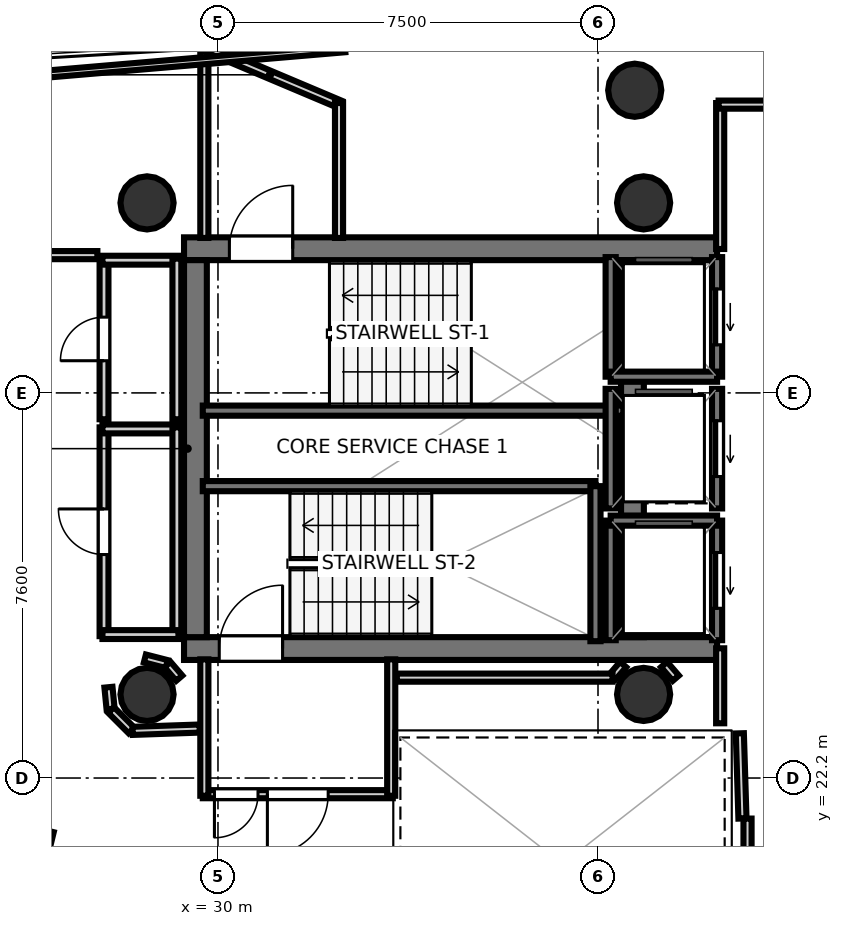
"""IFC4 building model, lengths in metres.
Left out: names, types, materials, properties, quantities, classifications, styles, units other than length and angle.
Written with IfcOpenShell. Run it as: python <this file> out.ifc"""

import sys

from ifc_helpers import new_model, si_unit, direction, frame, frame_2d, origin, origin_2d, place, context, subcontext, project, spatial, rectangle, hollow_circle, extrude, element, fill, save


model = new_model("IFC4")
c1 = context("Model", 3, precision=1e-05, world=origin(), true_north=direction((0.0, 1.0)))
c2 = subcontext(c1, "Body", "Model", "MODEL_VIEW")
j1 = project(units=[si_unit("LENGTHUNIT", "METRE"), si_unit("PLANEANGLEUNIT", "RADIAN")], contexts=[c1])
p1 = place(None, origin())
s1 = spatial("IfcSite", under=j1, at=p1, CompositionType="ELEMENT")
p2 = place(p1, origin())
s2 = spatial("IfcBuilding", under=s1, at=p2, CompositionType="ELEMENT")
p3 = place(p2, frame((0.0, 0.0, 264.9)))
s3 = spatial("IfcBuildingStorey", under=s2, at=p3, CompositionType="ELEMENT", Elevation=264.9)
p4 = place(p3, frame((29.33, 32.645, 0.0), z_axis=(0.0, 0.0, 1.0), x_axis=(1.0, 0.0, 0.0)))
e1 = element("IfcWall", 1, at=p4, inside=s3, PredefinedType="SHEAR", context=c2, shape_type="SweptSolid", body=[
    extrude(rectangle(XDim=10.52, YDim=0.45, at=frame_2d((5.26, 0.0))), origin(), (0.0, 0.0, 1.0), 3.52),
])
p5 = place(p4, frame((0.895, 0.0, 0.0)))
e2 = element("IfcOpeningElement", 2, at=p5, cuts=e1, PredefinedType="OPENING", context=c2, shape_type="SweptSolid", body=[
    extrude(rectangle(XDim=1.25, YDim=2.15, at=frame_2d((0.625, 1.075))), frame((0.0, 0.235, 0.0), z_axis=(0.0, -1.0, 0.0), x_axis=(1.0, 0.0, 0.0)), (0.0, 0.0, 1.0), 0.47),
])
p6 = place(p3, frame((29.33, 24.755, 0.0), z_axis=(0.0, 0.0, 1.0), x_axis=(1.0, 0.0, 0.0)))
e3 = element("IfcWall", 3, at=p6, inside=s3, PredefinedType="SHEAR", context=c2, shape_type="SweptSolid", body=[
    extrude(rectangle(XDim=10.52, YDim=0.45, at=frame_2d((5.26, 0.0))), origin(), (0.0, 0.0, 1.0), 3.52),
])
p7 = place(p6, frame((0.695, 0.0, 0.0)))
e4 = element("IfcOpeningElement", 4, at=p7, cuts=e3, PredefinedType="OPENING", context=c2, shape_type="SweptSolid", body=[
    extrude(rectangle(XDim=1.25, YDim=2.15, at=frame_2d((0.625, 1.075))), frame((0.0, 0.235, 0.0), z_axis=(0.0, -1.0, 0.0), x_axis=(1.0, 0.0, 0.0)), (0.0, 0.0, 1.0), 0.47),
])
for number, where, z_axis, x_axis in (
    (5, (29.555, 24.98, 0.0), (0.0, 0.0, 1.0), (0.0, 1.0, 0.0)),
    (6, (38.18, 24.98, 0.0), (0.0, 0.0, 1.0), (0.0, 1.0, 0.0)),
):
    element("IfcWall", number, at=place(p3, frame(where, z_axis=z_axis, x_axis=x_axis)), inside=s3, PredefinedType="SHEAR", context=c2, shape_type="SweptSolid", body=[
        extrude(rectangle(XDim=7.44, YDim=0.45, at=frame_2d((3.72, 0.0))), origin(), (0.0, 0.0, 1.0), 3.52),
    ])
for number, where, z_axis, x_axis in (
    (7, (28.6, 33.55, 0.0), (0.0, 0.0, 1.0), (1.0, 0.0, 0.0)),
    (8, (28.6, 23.85, 0.0), (0.0, 0.0, 1.0), (1.0, 0.0, 0.0)),
    (9, (38.4, 33.55, 0.0), (0.0, 0.0, 1.0), (1.0, 0.0, 0.0)),
    (10, (38.4, 23.85, 0.0), (0.0, 0.0, 1.0), (1.0, 0.0, 0.0)),
    (11, (38.225, 35.773, 0.0), (0.0, 0.0, 1.0), (1.0, 0.0, 0.0)),
):
    element("IfcColumn", number, at=place(p3, frame(where, z_axis=z_axis, x_axis=x_axis)), inside=s3, PredefinedType="COLUMN", context=c2, shape_type="SweptSolid", body=[
        extrude(hollow_circle(Radius=0.525, WallThickness=0.028, at=origin_2d()), origin(), (0.0, 0.0, 1.0), 3.7),
    ])
p8 = place(p3, frame((29.7, 29.45, 0.0), z_axis=(0.0, 0.0, 1.0), x_axis=(1.0, 0.0, 0.0)))
e12 = element("IfcWall", 12, at=p8, inside=s3, PredefinedType="SOLIDWALL", context=c2, shape_type="SweptSolid", body=[
    extrude(rectangle(XDim=8.3, YDim=0.2, at=frame_2d((4.15, 0.0))), origin(), (0.0, 0.0, 1.0), 3.52),
])
p9 = place(p3, frame((29.7, 27.96, 0.0), z_axis=(0.0, 0.0, 1.0), x_axis=(1.0, 0.0, 0.0)))
e13 = element("IfcWall", 13, at=p9, inside=s3, PredefinedType="SOLIDWALL", context=c2, shape_type="SweptSolid", body=[
    extrude(rectangle(XDim=7.75, YDim=0.2, at=frame_2d((3.875, 0.0))), origin(), (0.0, 0.0, 1.0), 3.52),
])
p10 = place(p3, frame((37.45, 24.9, 0.0), z_axis=(0.0, 0.0, 1.0), x_axis=(0.0, 1.0, 0.0)))
e14 = element("IfcWall", 14, at=p10, inside=s3, PredefinedType="SOLIDWALL", context=c2, shape_type="SweptSolid", body=[
    extrude(rectangle(XDim=3.06, YDim=0.2, at=frame_2d((1.53, 0.0))), origin(), (0.0, 0.0, 1.0), 3.52),
])
p11 = place(p3, frame((39.85, 30.12, 0.0), z_axis=(0.0, 0.0, 1.0), x_axis=(0.0, 1.0, 0.0)))
e15 = element("IfcWall", 15, at=p11, inside=s3, PredefinedType="SOLIDWALL", context=c2, shape_type="SweptSolid", body=[
    extrude(rectangle(XDim=2.36, YDim=0.2, at=frame_2d((1.18, 0.0))), origin(), (0.0, 0.0, 1.0), 3.52),
])
p12 = place(p11, frame((0.63, 0.0, 0.0)))
e16 = element("IfcOpeningElement", 16, at=p12, cuts=e15, PredefinedType="OPENING", context=c2, shape_type="SweptSolid", body=[
    extrude(rectangle(XDim=1.1, YDim=2.15, at=frame_2d((0.55, 1.075))), frame((0.0, 0.11, 0.0), z_axis=(0.0, -1.0, 0.0), x_axis=(1.0, 0.0, 0.0)), (0.0, 0.0, 1.0), 0.22),
])
p13 = place(p3, frame((37.75, 30.12, 0.0), z_axis=(0.0, 0.0, 1.0), x_axis=(0.0, 1.0, 0.0)))
e17 = element("IfcWall", 17, at=p13, inside=s3, PredefinedType="SOLIDWALL", context=c2, shape_type="SweptSolid", body=[
    extrude(rectangle(XDim=2.36, YDim=0.2, at=frame_2d((1.18, 0.0))), origin(), (0.0, 0.0, 1.0), 3.52),
])
p14 = place(p3, frame((37.75, 30.12, 0.0), z_axis=(0.0, 0.0, 1.0), x_axis=(1.0, 0.0, 0.0)))
e18 = element("IfcWall", 18, at=p14, inside=s3, PredefinedType="SOLIDWALL", context=c2, shape_type="SweptSolid", body=[
    extrude(rectangle(XDim=2.1, YDim=0.2, at=frame_2d((1.05, 0.0))), origin(), (0.0, 0.0, 1.0), 3.52),
])
p15 = place(p3, frame((39.85, 24.92, 0.0), z_axis=(0.0, 0.0, 1.0), x_axis=(0.0, 1.0, 0.0)))
e19 = element("IfcWall", 19, at=p15, inside=s3, PredefinedType="SOLIDWALL", context=c2, shape_type="SweptSolid", body=[
    extrude(rectangle(XDim=2.36, YDim=0.2, at=frame_2d((1.18, 0.0))), origin(), (0.0, 0.0, 1.0), 3.52),
])
p16 = place(p15, frame((0.63, 0.0, 0.0)))
e20 = element("IfcOpeningElement", 20, at=p16, cuts=e19, PredefinedType="OPENING", context=c2, shape_type="SweptSolid", body=[
    extrude(rectangle(XDim=1.1, YDim=2.15, at=frame_2d((0.55, 1.075))), frame((0.0, 0.11, 0.0), z_axis=(0.0, -1.0, 0.0), x_axis=(1.0, 0.0, 0.0)), (0.0, 0.0, 1.0), 0.22),
])
p17 = place(p3, frame((37.75, 24.92, 0.0), z_axis=(0.0, 0.0, 1.0), x_axis=(0.0, 1.0, 0.0)))
e21 = element("IfcWall", 21, at=p17, inside=s3, PredefinedType="SOLIDWALL", context=c2, shape_type="SweptSolid", body=[
    extrude(rectangle(XDim=2.36, YDim=0.2, at=frame_2d((1.18, 0.0))), origin(), (0.0, 0.0, 1.0), 3.52),
])
p18 = place(p3, frame((37.75, 27.28, 0.0), z_axis=(0.0, 0.0, 1.0), x_axis=(1.0, 0.0, 0.0)))
e22 = element("IfcWall", 22, at=p18, inside=s3, PredefinedType="SOLIDWALL", context=c2, shape_type="SweptSolid", body=[
    extrude(rectangle(XDim=2.1, YDim=0.2, at=frame_2d((1.05, 0.0))), origin(), (0.0, 0.0, 1.0), 3.52),
])
p19 = place(p3, frame((39.85, 27.52, 0.0), z_axis=(0.0, 0.0, 1.0), x_axis=(0.0, 1.0, 0.0)))
e23 = element("IfcWall", 23, at=p19, inside=s3, PredefinedType="SOLIDWALL", context=c2, shape_type="SweptSolid", body=[
    extrude(rectangle(XDim=2.36, YDim=0.2, at=frame_2d((1.18, 0.0))), origin(), (0.0, 0.0, 1.0), 3.52),
])
p20 = place(p19, frame((0.63, 0.0, 0.0)))
e24 = element("IfcOpeningElement", 24, at=p20, cuts=e23, PredefinedType="OPENING", context=c2, shape_type="SweptSolid", body=[
    extrude(rectangle(XDim=1.1, YDim=2.15, at=frame_2d((0.55, 1.075))), frame((0.0, 0.11, 0.0), z_axis=(0.0, -1.0, 0.0), x_axis=(1.0, 0.0, 0.0)), (0.0, 0.0, 1.0), 0.22),
])
p21 = place(p3, frame((37.75, 27.52, 0.0), z_axis=(0.0, 0.0, 1.0), x_axis=(0.0, 1.0, 0.0)))
e25 = element("IfcWall", 25, at=p21, inside=s3, PredefinedType="SOLIDWALL", context=c2, shape_type="SweptSolid", body=[
    extrude(rectangle(XDim=2.36, YDim=0.2, at=frame_2d((1.18, 0.0))), origin(), (0.0, 0.0, 1.0), 3.52),
])
p22 = place(p3, frame((29.731, 32.858, 0.0), z_axis=(0.0, 0.0, 1.0), x_axis=(0.0, 1.0, 0.0)))
e26 = element("IfcWall", 26, at=p22, inside=s3, PredefinedType="PARTITIONING", context=c2, shape_type="SweptSolid", body=[
    extrude(rectangle(XDim=3.834, YDim=0.16, at=frame_2d((1.917, 0.0))), origin(), (0.0, 0.0, 1.0), 2.84),
])
p23 = place(p3, frame((29.632, 36.666, 0.0), z_axis=(0.0, 0.0, 1.0), x_axis=(0.921284244724, -0.388889882131, 0.0)))
e27 = element("IfcWall", 27, at=p23, inside=s3, PredefinedType="PARTITIONING", context=c2, shape_type="SweptSolid", body=[
    extrude(rectangle(XDim=3.027, YDim=0.16, at=frame_2d((1.513, 0.0))), origin(), (0.0, 0.0, 1.0), 2.84),
])
p24 = place(p3, frame((32.389, 35.52, 0.0), z_axis=(0.0, 0.0, 1.0), x_axis=(0.0, -1.0, 0.0)))
e28 = element("IfcWall", 28, at=p24, inside=s3, PredefinedType="PARTITIONING", context=c2, shape_type="SweptSolid", body=[
    extrude(rectangle(XDim=2.662, YDim=0.16, at=frame_2d((1.331, 0.0))), origin(), (0.0, 0.0, 1.0), 2.84),
])
p25 = place(p3, frame((33.45, 21.881, 0.0), z_axis=(0.0, 0.0, 1.0), x_axis=(-1.0, 0.0, 0.0)))
e29 = element("IfcWall", 29, at=p25, inside=s3, PredefinedType="PARTITIONING", context=c2, shape_type="SweptSolid", body=[
    extrude(rectangle(XDim=3.75, YDim=0.16, at=frame_2d((1.875, 0.0))), origin(), (0.0, 0.0, 1.0), 2.84),
])
p26 = place(p25, frame((1.275, 0.0, 0.0)))
e30 = element("IfcOpeningElement", 30, at=p26, cuts=e29, PredefinedType="OPENING", context=c2, shape_type="SweptSolid", body=[
    extrude(rectangle(XDim=1.2, YDim=2.15, at=frame_2d((0.6, 1.075))), frame((0.0, 0.09, 0.0), z_axis=(0.0, -1.0, 0.0), x_axis=(1.0, 0.0, 0.0)), (0.0, 0.0, 1.0), 0.18),
])
p27 = place(p25, frame((2.66, 0.0, 0.0)))
e31 = element("IfcOpeningElement", 31, at=p27, cuts=e29, PredefinedType="OPENING", context=c2, shape_type="SweptSolid", body=[
    extrude(rectangle(XDim=0.86, YDim=2.05, at=frame_2d((0.43, 1.025))), frame((0.0, 0.09, 0.0), z_axis=(0.0, -1.0, 0.0), x_axis=(1.0, 0.0, 0.0)), (0.0, 0.0, 1.0), 0.18),
])
for number, where, z_axis, x_axis in (
    (32, (29.731, 21.85, 0.0), (0.0, 0.0, 1.0), (0.0, 1.0, 0.0)),
    (33, (33.419, 24.542, 0.0), (0.0, 0.0, 1.0), (0.0, -1.0, 0.0)),
):
    element("IfcWall", number, at=place(p3, frame(where, z_axis=z_axis, x_axis=x_axis)), inside=s3, PredefinedType="PARTITIONING", context=c2, shape_type="SweptSolid", body=[
        extrude(rectangle(XDim=2.692, YDim=0.16, at=frame_2d((1.346, 0.0))), origin(), (0.0, 0.0, 1.0), 2.84),
    ])
p28 = place(p3, frame((40.351, 21.401, 0.0), z_axis=(0.0, 0.0, 1.0), x_axis=(-0.031058045979, 0.999517582527, 0.0)))
e34 = element("IfcWall", 34, at=p28, inside=s3, PredefinedType="PARTITIONING", context=c2, shape_type="SweptSolid", body=[
    extrude(rectangle(XDim=1.682, YDim=0.16, at=frame_2d((0.841, 0.0))), origin(), (0.0, 0.0, 1.0), 2.84),
])
p29 = place(p3, frame((39.911, 23.28, 0.0), z_axis=(0.0, 0.0, 1.0), x_axis=(0.0, 1.0, 0.0)))
e35 = element("IfcWall", 35, at=p29, inside=s3, PredefinedType="PARTITIONING", context=c2, shape_type="SweptSolid", body=[
    extrude(rectangle(XDim=1.48, YDim=0.16, at=frame_2d((0.74, 0.0))), origin(), (0.0, 0.0, 1.0), 2.84),
])
p30 = place(p3, frame((39.911, 32.64, 0.0), z_axis=(0.0, 0.0, 1.0), x_axis=(0.0, 1.0, 0.0)))
e36 = element("IfcWall", 36, at=p30, inside=s3, PredefinedType="PARTITIONING", context=c2, shape_type="SweptSolid", body=[
    extrude(rectangle(XDim=2.88, YDim=0.16, at=frame_2d((1.44, 0.0))), origin(), (0.0, 0.0, 1.0), 2.84),
])
p31 = place(p3, frame((39.88, 35.489, 0.0), z_axis=(0.0, 0.0, 1.0), x_axis=(1.0, 0.0, 0.0)))
e37 = element("IfcWall", 37, at=p31, inside=s3, PredefinedType="PARTITIONING", context=c2, shape_type="SweptSolid", body=[
    extrude(rectangle(XDim=1.48, YDim=0.16, at=frame_2d((0.74, 0.0))), origin(), (0.0, 0.0, 1.0), 2.84),
])
p32 = place(p3, frame((40.451, 18.08, 0.0), z_axis=(0.0, 0.0, 1.0), x_axis=(0.0, 1.0, 0.0)))
e38 = element("IfcWall", 38, at=p32, inside=s3, PredefinedType="PARTITIONING", context=c2, shape_type="SweptSolid", body=[
    extrude(rectangle(XDim=3.32, YDim=0.16, at=frame_2d((1.66, 0.0))), origin(), (0.0, 0.0, 1.0), 2.84),
])
p33 = place(p3, frame((27.751, 25.0, 0.0), z_axis=(0.0, 0.0, 1.0), x_axis=(0.0, 1.0, 0.0)))
e39 = element("IfcWall", 39, at=p33, inside=s3, PredefinedType="PLUMBINGWALL", context=c2, shape_type="SweptSolid", body=[
    extrude(rectangle(XDim=4.12, YDim=0.175, at=frame_2d((2.06, 0.0))), origin(), (0.0, 0.0, 1.0), 2.84),
])
p34 = place(p33, frame((1.61, 0.0, 0.0)))
e40 = element("IfcOpeningElement", 40, at=p34, cuts=e39, PredefinedType="OPENING", context=c2, shape_type="SweptSolid", body=[
    extrude(rectangle(XDim=0.9, YDim=2.1, at=frame_2d((0.45, 1.05))), frame((0.0, 0.097, 0.0), z_axis=(0.0, -1.0, 0.0), x_axis=(1.0, 0.0, 0.0)), (0.0, 0.0, 1.0), 0.195),
])
p35 = place(p3, frame((27.72, 29.089, 0.0), z_axis=(0.0, 0.0, 1.0), x_axis=(1.0, 0.0, 0.0)))
e41 = element("IfcWall", 41, at=p35, inside=s3, PredefinedType="PLUMBINGWALL", context=c2, shape_type="SweptSolid", body=[
    extrude(rectangle(XDim=1.5, YDim=0.175, at=frame_2d((0.75, 0.0))), origin(), (0.0, 0.0, 1.0), 2.84),
])
p36 = place(p3, frame((29.189, 29.12, 0.0), z_axis=(0.0, 0.0, 1.0), x_axis=(0.0, -1.0, 0.0)))
e42 = element("IfcWall", 42, at=p36, inside=s3, PredefinedType="PLUMBINGWALL", context=c2, shape_type="SweptSolid", body=[
    extrude(rectangle(XDim=4.12, YDim=0.175, at=frame_2d((2.06, 0.0))), origin(), (0.0, 0.0, 1.0), 2.84),
])
p37 = place(p3, frame((29.22, 25.031, 0.0), z_axis=(0.0, 0.0, 1.0), x_axis=(-1.0, 0.0, 0.0)))
e43 = element("IfcWall", 43, at=p37, inside=s3, PredefinedType="PLUMBINGWALL", context=c2, shape_type="SweptSolid", body=[
    extrude(rectangle(XDim=1.5, YDim=0.175, at=frame_2d((0.75, 0.0))), origin(), (0.0, 0.0, 1.0), 2.84),
])
p38 = place(p3, frame((27.751, 29.28, 0.0), z_axis=(0.0, 0.0, 1.0), x_axis=(0.0, 1.0, 0.0)))
e44 = element("IfcWall", 44, at=p38, inside=s3, PredefinedType="PLUMBINGWALL", context=c2, shape_type="SweptSolid", body=[
    extrude(rectangle(XDim=3.17, YDim=0.175, at=frame_2d((1.585, 0.0))), origin(), (0.0, 0.0, 1.0), 2.84),
])
p39 = place(p38, frame((1.155, 0.0, 0.0)))
e45 = element("IfcOpeningElement", 45, at=p39, cuts=e44, PredefinedType="OPENING", context=c2, shape_type="SweptSolid", body=[
    extrude(rectangle(XDim=0.86, YDim=2.05, at=frame_2d((0.43, 1.025))), frame((0.0, 0.097, 0.0), z_axis=(0.0, -1.0, 0.0), x_axis=(1.0, 0.0, 0.0)), (0.0, 0.0, 1.0), 0.195),
])
p40 = place(p3, frame((27.72, 32.419, 0.0), z_axis=(0.0, 0.0, 1.0), x_axis=(1.0, 0.0, 0.0)))
e46 = element("IfcWall", 46, at=p40, inside=s3, PredefinedType="PLUMBINGWALL", context=c2, shape_type="SweptSolid", body=[
    extrude(rectangle(XDim=1.5, YDim=0.175, at=frame_2d((0.75, 0.0))), origin(), (0.0, 0.0, 1.0), 2.84),
])
p41 = place(p3, frame((29.189, 32.45, 0.0), z_axis=(0.0, 0.0, 1.0), x_axis=(0.0, -1.0, 0.0)))
e47 = element("IfcWall", 47, at=p41, inside=s3, PredefinedType="PLUMBINGWALL", context=c2, shape_type="SweptSolid", body=[
    extrude(rectangle(XDim=3.17, YDim=0.175, at=frame_2d((1.585, 0.0))), origin(), (0.0, 0.0, 1.0), 2.84),
])
p42 = place(p3, frame((29.236, 24.17, 0.0), z_axis=(0.0, 0.0, 1.0), x_axis=(-0.652260263346, 0.757995084984, 0.0)))
e48 = element("IfcWall", 48, at=p42, inside=s3, PredefinedType="PARTITIONING", context=c2, shape_type="SweptSolid", body=[
    extrude(rectangle(XDim=0.355, YDim=0.16, at=frame_2d((0.178, 0.0))), origin(), (0.0, 0.0, 1.0), 2.84),
])
p43 = place(p3, frame((28.988, 24.45, 0.0), z_axis=(0.0, 0.0, 1.0), x_axis=(-0.968704505916, 0.248216800836, 0.0)))
e49 = element("IfcWall", 49, at=p43, inside=s3, PredefinedType="PARTITIONING", context=c2, shape_type="SweptSolid", body=[
    extrude(rectangle(XDim=0.445, YDim=0.16, at=frame_2d((0.222, 0.0))), origin(), (0.0, 0.0, 1.0), 2.84),
])
p44 = place(p3, frame((39.036, 24.17, 0.0), z_axis=(0.0, 0.0, 1.0), x_axis=(-0.652260263346, 0.757995084984, 0.0)))
e50 = element("IfcWall", 50, at=p44, inside=s3, PredefinedType="PARTITIONING", context=c2, shape_type="SweptSolid", body=[
    extrude(rectangle(XDim=0.355, YDim=0.16, at=frame_2d((0.178, 0.0))), origin(), (0.0, 0.0, 1.0), 2.84),
])
p45 = place(p3, frame((37.996, 24.44, 0.0), z_axis=(0.0, 0.0, 1.0), x_axis=(-0.652425645794, -0.757852740782, 0.0)))
e51 = element("IfcWall", 51, at=p45, inside=s3, PredefinedType="PARTITIONING", context=c2, shape_type="SweptSolid", body=[
    extrude(rectangle(XDim=0.32, YDim=0.16, at=frame_2d((0.16, 0.0))), origin(), (0.0, 0.0, 1.0), 2.84),
])
p46 = place(p3, frame((37.787, 24.181, 0.0), z_axis=(0.0, 0.0, 1.0), x_axis=(-1.0, 0.0, 0.0)))
e52 = element("IfcWall", 52, at=p46, inside=s3, PredefinedType="PARTITIONING", context=c2, shape_type="SweptSolid", body=[
    extrude(rectangle(XDim=4.257, YDim=0.16, at=frame_2d((2.129, 0.0))), origin(), (0.0, 0.0, 1.0), 2.84),
])
p47 = place(p3, frame((27.838, 23.992, 0.0), z_axis=(0.0, 0.0, 1.0), x_axis=(0.098273407977, -0.995159453196, 0.0)))
e53 = element("IfcWall", 53, at=p47, inside=s3, PredefinedType="PARTITIONING", context=c2, shape_type="SweptSolid", body=[
    extrude(rectangle(XDim=0.432, YDim=0.16, at=frame_2d((0.216, 0.0))), origin(), (0.0, 0.0, 1.0), 2.84),
])
p48 = place(p3, frame((27.89, 23.543, 0.0), z_axis=(0.0, 0.0, 1.0), x_axis=(0.707106781187, -0.707106781187, 0.0)))
e54 = element("IfcWall", 54, at=p48, inside=s3, PredefinedType="PARTITIONING", context=c2, shape_type="SweptSolid", body=[
    extrude(rectangle(XDim=0.57, YDim=0.16, at=frame_2d((0.285, 0.0))), origin(), (0.0, 0.0, 1.0), 2.84),
])
p49 = place(p3, frame((28.316, 23.131, 0.0), z_axis=(0.0, 0.0, 1.0), x_axis=(0.999405342193, 0.034481328227, 0.0)))
e55 = element("IfcWall", 55, at=p49, inside=s3, PredefinedType="PARTITIONING", context=c2, shape_type="SweptSolid", body=[
    extrude(rectangle(XDim=1.324, YDim=0.16, at=frame_2d((0.662, 0.0))), origin(), (0.0, 0.0, 1.0), 2.84),
])
p50 = place(p3, frame((25.784, 17.479, 0.0), z_axis=(0.0, 0.0, 1.0), x_axis=(0.237439542351, 0.971402318161, 0.0)))
e56 = element("IfcWall", 56, at=p50, inside=s3, PredefinedType="PARTITIONING", context=c2, shape_type="SweptSolid", body=[
    extrude(rectangle(XDim=3.779, YDim=0.16, at=frame_2d((1.889, 0.0))), origin(), (0.0, 0.0, 1.0), 2.84),
])
p51 = place(p3, frame((25.25, 32.519, 0.0), z_axis=(0.0, 0.0, 1.0), x_axis=(1.0, 0.0, 0.0)))
e57 = element("IfcWall", 57, at=p51, inside=s3, PredefinedType="PARTITIONING", context=c2, shape_type="SweptSolid", body=[
    extrude(rectangle(XDim=2.37, YDim=0.16, at=frame_2d((1.185, 0.0))), origin(), (0.0, 0.0, 1.0), 2.84),
])
p52 = place(p3, frame((55.174, 31.494, 0.0), z_axis=(0.0, 0.0, 1.0), x_axis=(-0.615208730104, -0.788364267584, 0.0)))
e58 = element("IfcWall", 58, at=p52, inside=s3, PredefinedType="PARTITIONING", context=c2, shape_type="SweptSolid", body=[
    extrude(rectangle(XDim=26.507, YDim=0.12, at=frame_2d((13.253, 0.0))), origin(), (0.0, 0.0, 1.0), 2.84),
])
p53 = place(p3, frame((20.976, 35.611, 0.0), z_axis=(0.0, 0.0, 1.0), x_axis=(0.996394593443, 0.084839932569, 0.0)))
e59 = element("IfcWall", 59, at=p53, inside=s3, PredefinedType="PARTITIONING", context=c2, shape_type="SweptSolid", body=[
    extrude(rectangle(XDim=11.574, YDim=0.14, at=frame_2d((5.787, 0.0))), origin(), (0.0, 0.0, 1.0), 2.84),
])
p54 = place(p5, origin())
e60 = element("IfcDoor", 60, at=p54, inside=s3, OperationType="SINGLE_SWING_RIGHT", PredefinedType="DOOR", context=c2, shape_type="SweptSolid", body=[
    extrude(rectangle(XDim=1.25, YDim=2.15, at=frame_2d((0.625, 1.075))), frame((0.0, 0.025, 0.0), z_axis=(0.0, -1.0, 0.0), x_axis=(1.0, 0.0, 0.0)), (0.0, 0.0, 1.0), 0.05),
])
fill(e2, e60)
p55 = place(p7, origin())
e61 = element("IfcDoor", 61, at=p55, inside=s3, OperationType="SINGLE_SWING_RIGHT", PredefinedType="DOOR", context=c2, shape_type="SweptSolid", body=[
    extrude(rectangle(XDim=1.25, YDim=2.15, at=frame_2d((0.625, 1.075))), frame((0.0, 0.025, 0.0), z_axis=(0.0, -1.0, 0.0), x_axis=(1.0, 0.0, 0.0)), (0.0, 0.0, 1.0), 0.05),
])
fill(e4, e61)
p56 = place(p12, origin())
e62 = element("IfcDoor", 62, at=p56, inside=s3, OperationType="SLIDING_TO_LEFT", PredefinedType="DOOR", context=c2, shape_type="SweptSolid", body=[
    extrude(rectangle(XDim=1.1, YDim=2.15, at=frame_2d((0.55, 1.075))), frame((0.0, 0.025, 0.0), z_axis=(0.0, -1.0, 0.0), x_axis=(1.0, 0.0, 0.0)), (0.0, 0.0, 1.0), 0.05),
])
fill(e16, e62)
p57 = place(p16, origin())
e63 = element("IfcDoor", 63, at=p57, inside=s3, OperationType="SLIDING_TO_LEFT", PredefinedType="DOOR", context=c2, shape_type="SweptSolid", body=[
    extrude(rectangle(XDim=1.1, YDim=2.15, at=frame_2d((0.55, 1.075))), frame((0.0, 0.025, 0.0), z_axis=(0.0, -1.0, 0.0), x_axis=(1.0, 0.0, 0.0)), (0.0, 0.0, 1.0), 0.05),
])
fill(e20, e63)
p58 = place(p20, origin())
e64 = element("IfcDoor", 64, at=p58, inside=s3, OperationType="SLIDING_TO_LEFT", PredefinedType="DOOR", context=c2, shape_type="SweptSolid", body=[
    extrude(rectangle(XDim=1.1, YDim=2.15, at=frame_2d((0.55, 1.075))), frame((0.0, 0.025, 0.0), z_axis=(0.0, -1.0, 0.0), x_axis=(1.0, 0.0, 0.0)), (0.0, 0.0, 1.0), 0.05),
])
fill(e24, e64)
p59 = place(p26, origin())
e65 = element("IfcDoor", 65, at=p59, inside=s3, OperationType="SINGLE_SWING_RIGHT", PredefinedType="DOOR", context=c2, shape_type="SweptSolid", body=[
    extrude(rectangle(XDim=1.2, YDim=2.15, at=frame_2d((0.6, 1.075))), frame((0.0, 0.025, 0.0), z_axis=(0.0, -1.0, 0.0), x_axis=(1.0, 0.0, 0.0)), (0.0, 0.0, 1.0), 0.05),
])
fill(e30, e65)
p60 = place(p34, origin())
e66 = element("IfcDoor", 66, at=p60, inside=s3, OperationType="SINGLE_SWING_RIGHT", PredefinedType="DOOR", context=c2, shape_type="SweptSolid", body=[
    extrude(rectangle(XDim=0.9, YDim=2.1, at=frame_2d((0.45, 1.05))), frame((0.0, 0.025, 0.0), z_axis=(0.0, -1.0, 0.0), x_axis=(1.0, 0.0, 0.0)), (0.0, 0.0, 1.0), 0.05),
])
fill(e40, e66)
p61 = place(p39, origin())
e67 = element("IfcDoor", 67, at=p61, inside=s3, OperationType="SINGLE_SWING_LEFT", PredefinedType="DOOR", context=c2, shape_type="SweptSolid", body=[
    extrude(rectangle(XDim=0.86, YDim=2.05, at=frame_2d((0.43, 1.025))), frame((0.0, 0.025, 0.0), z_axis=(0.0, -1.0, 0.0), x_axis=(1.0, 0.0, 0.0)), (0.0, 0.0, 1.0), 0.05),
])
fill(e45, e67)
p62 = place(p27, origin())
e68 = element("IfcDoor", 68, at=p62, inside=s3, OperationType="SINGLE_SWING_RIGHT", PredefinedType="DOOR", context=c2, shape_type="SweptSolid", body=[
    extrude(rectangle(XDim=0.86, YDim=2.05, at=frame_2d((0.43, 1.025))), frame((0.0, 0.025, 0.0), z_axis=(0.0, -1.0, 0.0), x_axis=(1.0, 0.0, 0.0)), (0.0, 0.0, 1.0), 0.05),
])
fill(e31, e68)
save(model, sys.argv[1])
